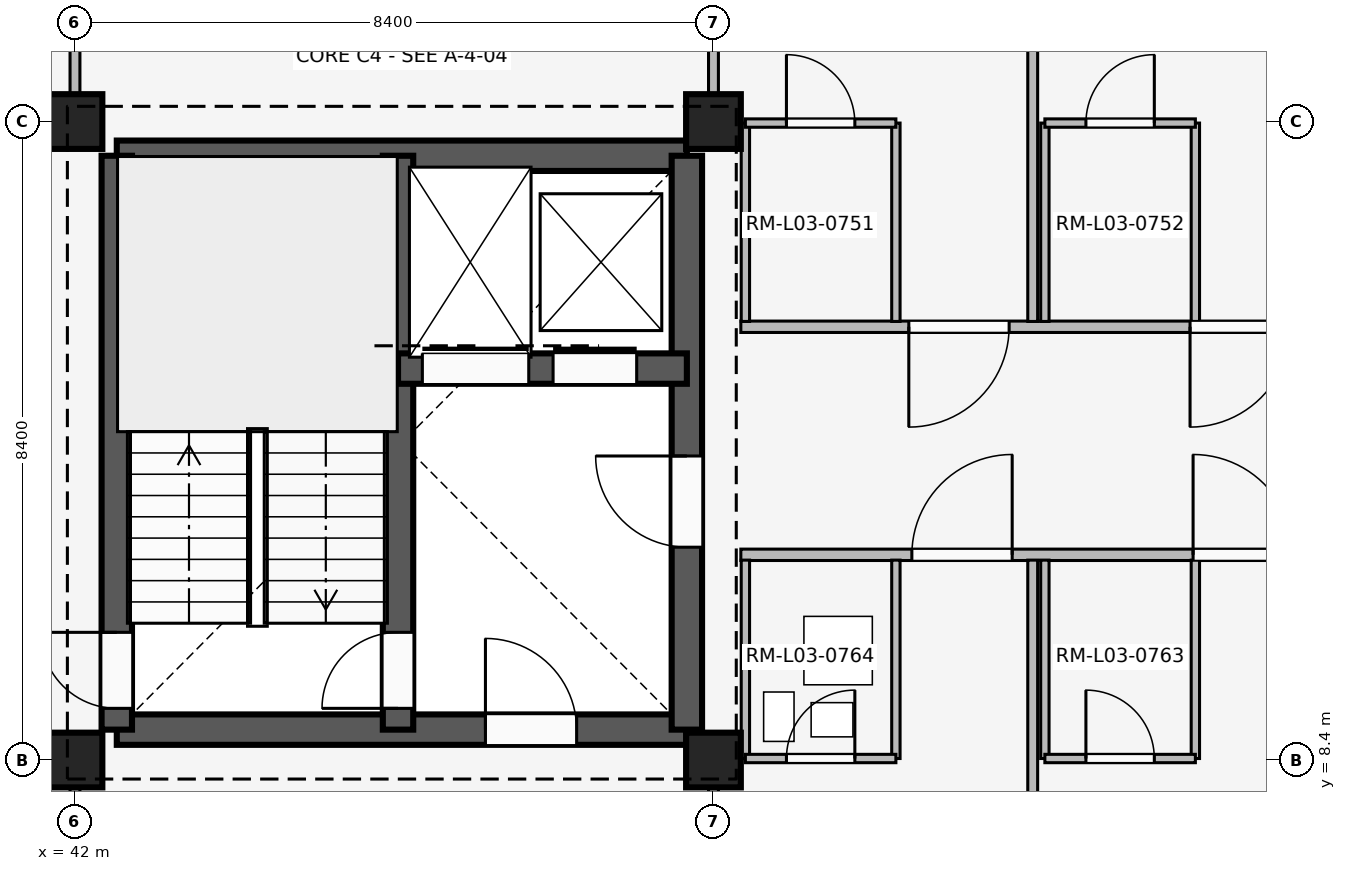
"""IFC4 building model, lengths in metres.
Left out: names, types, materials, properties, quantities, classifications, styles, units other than length and angle.
Written with IfcOpenShell. Run it as: python <this file> out.ifc"""

import sys

from ifc_helpers import new_model, si_unit, direction, frame, frame_2d, origin, origin_2d, place, context, subcontext, project, spatial, rectangle, extrude, element, fill, save


model = new_model("IFC4")
c1 = context("Model", 3, precision=1e-05, world=origin(), true_north=direction((0.0, 1.0)))
c2 = subcontext(c1, "Body", "Model", "MODEL_VIEW")
j1 = project(units=[si_unit("LENGTHUNIT", "METRE"), si_unit("PLANEANGLEUNIT", "RADIAN")], contexts=[c1])
p1 = place(None, origin())
s1 = spatial("IfcSite", under=j1, at=p1, CompositionType="ELEMENT")
p2 = place(p1, origin())
s2 = spatial("IfcBuilding", under=s1, at=p2, CompositionType="ELEMENT")
p3 = place(p2, frame((0.0, 0.0, 12.9)))
s3 = spatial("IfcBuildingStorey", under=s2, at=p3, CompositionType="ELEMENT", Elevation=12.9)
for number, where, z_axis, x_axis in (
    (1, (42.0, 8.4, 0.0), (0.0, 0.0, 1.0), (1.0, 0.0, 0.0)),
    (2, (42.0, 16.8, 0.0), (0.0, 0.0, 1.0), (1.0, 0.0, 0.0)),
    (3, (50.4, 8.4, 0.0), (0.0, 0.0, 1.0), (1.0, 0.0, 0.0)),
    (4, (50.4, 16.8, 0.0), (0.0, 0.0, 1.0), (1.0, 0.0, 0.0)),
):
    element("IfcColumn", number, at=place(p3, frame(where, z_axis=z_axis, x_axis=x_axis)), inside=s3, PredefinedType="COLUMN", context=c2, shape_type="SweptSolid", body=[
        extrude(rectangle(XDim=0.72, YDim=0.72, at=origin_2d()), origin(), (0.0, 0.0, 1.0), 3.3),
    ])
p4 = place(p3, frame((42.55, 8.8, 0.0), z_axis=(0.0, 0.0, 1.0), x_axis=(1.0, 0.0, 0.0)))
e5 = element("IfcWall", 5, at=p4, inside=s3, PredefinedType="SHEAR", context=c2, shape_type="SweptSolid", body=[
    extrude(rectangle(XDim=7.5, YDim=0.4, at=frame_2d((3.75, 0.0))), origin(), (0.0, 0.0, 1.0), 3.02),
])
p5 = place(p4, frame((4.85, 0.0, 0.0)))
e6 = element("IfcOpeningElement", 6, at=p5, cuts=e5, PredefinedType="OPENING", context=c2, shape_type="SweptSolid", body=[
    extrude(rectangle(XDim=1.2, YDim=2.2, at=frame_2d((0.6, 1.1))), frame((0.0, 0.21, 0.0), z_axis=(0.0, -1.0, 0.0), x_axis=(1.0, 0.0, 0.0)), (0.0, 0.0, 1.0), 0.42),
])
p6 = place(p3, frame((42.55, 16.35, 0.0), z_axis=(0.0, 0.0, 1.0), x_axis=(1.0, 0.0, 0.0)))
e7 = element("IfcWall", 7, at=p6, inside=s3, PredefinedType="SHEAR", context=c2, shape_type="SweptSolid", body=[
    extrude(rectangle(XDim=7.5, YDim=0.4, at=frame_2d((3.75, 0.0))), origin(), (0.0, 0.0, 1.0), 3.02),
])
p7 = place(p3, frame((42.55, 8.8, 0.0), z_axis=(0.0, 0.0, 1.0), x_axis=(0.0, 1.0, 0.0)))
e8 = element("IfcWall", 8, at=p7, inside=s3, PredefinedType="SHEAR", context=c2, shape_type="SweptSolid", body=[
    extrude(rectangle(XDim=7.55, YDim=0.4, at=frame_2d((3.775, 0.0))), origin(), (0.0, 0.0, 1.0), 3.02),
])
p8 = place(p7, frame((0.28, 0.0, 0.0)))
e9 = element("IfcOpeningElement", 9, at=p8, cuts=e8, PredefinedType="OPENING", context=c2, shape_type="SweptSolid", body=[
    extrude(rectangle(XDim=1.0, YDim=2.15, at=frame_2d((0.5, 1.075))), frame((0.0, 0.21, 0.0), z_axis=(0.0, -1.0, 0.0), x_axis=(1.0, 0.0, 0.0)), (0.0, 0.0, 1.0), 0.42),
])
p9 = place(p3, frame((50.05, 8.8, 0.0), z_axis=(0.0, 0.0, 1.0), x_axis=(0.0, 1.0, 0.0)))
e10 = element("IfcWall", 10, at=p9, inside=s3, PredefinedType="SHEAR", context=c2, shape_type="SweptSolid", body=[
    extrude(rectangle(XDim=7.55, YDim=0.4, at=frame_2d((3.775, 0.0))), origin(), (0.0, 0.0, 1.0), 3.02),
])
p10 = place(p9, frame((2.4, 0.0, 0.0)))
e11 = element("IfcOpeningElement", 11, at=p10, cuts=e10, PredefinedType="OPENING", context=c2, shape_type="SweptSolid", body=[
    extrude(rectangle(XDim=1.2, YDim=2.2, at=frame_2d((0.6, 1.1))), frame((0.0, 0.21, 0.0), z_axis=(0.0, -1.0, 0.0), x_axis=(1.0, 0.0, 0.0)), (0.0, 0.0, 1.0), 0.42),
])
p11 = place(p3, frame((46.25, 8.8, 0.0), z_axis=(0.0, 0.0, 1.0), x_axis=(0.0, 1.0, 0.0)))
e12 = element("IfcWall", 12, at=p11, inside=s3, PredefinedType="SHEAR", context=c2, shape_type="SweptSolid", body=[
    extrude(rectangle(XDim=7.55, YDim=0.4, at=frame_2d((3.775, 0.0))), origin(), (0.0, 0.0, 1.0), 3.02),
])
p12 = place(p11, frame((0.28, 0.0, 0.0)))
e13 = element("IfcOpeningElement", 13, at=p12, cuts=e12, PredefinedType="OPENING", context=c2, shape_type="SweptSolid", body=[
    extrude(rectangle(XDim=1.0, YDim=2.15, at=frame_2d((0.5, 1.075))), frame((0.0, 0.21, 0.0), z_axis=(0.0, -1.0, 0.0), x_axis=(1.0, 0.0, 0.0)), (0.0, 0.0, 1.0), 0.42),
])
p13 = place(p3, frame((46.25, 13.55, 0.0), z_axis=(0.0, 0.0, 1.0), x_axis=(1.0, 0.0, 0.0)))
e14 = element("IfcWall", 14, at=p13, inside=s3, PredefinedType="SHEAR", context=c2, shape_type="SweptSolid", body=[
    extrude(rectangle(XDim=3.8, YDim=0.4, at=frame_2d((1.9, 0.0))), origin(), (0.0, 0.0, 1.0), 3.02),
])
p14 = place(p13, frame((0.32, 0.0, 0.0)))
e15 = element("IfcOpeningElement", 15, at=p14, cuts=e14, PredefinedType="OPENING", context=c2, shape_type="SweptSolid", body=[
    extrude(rectangle(XDim=1.4, YDim=2.25, at=frame_2d((0.7, 1.125))), frame((0.0, 0.21, 0.0), z_axis=(0.0, -1.0, 0.0), x_axis=(1.0, 0.0, 0.0)), (0.0, 0.0, 1.0), 0.42),
])
p15 = place(p13, frame((2.04, 0.0, 0.0)))
e16 = element("IfcOpeningElement", 16, at=p15, cuts=e14, PredefinedType="OPENING", context=c2, shape_type="SweptSolid", body=[
    extrude(rectangle(XDim=1.1, YDim=2.15, at=frame_2d((0.55, 1.075))), frame((0.0, 0.21, 0.0), z_axis=(0.0, -1.0, 0.0), x_axis=(1.0, 0.0, 0.0)), (0.0, 0.0, 1.0), 0.42),
])
p16 = place(p3, frame((42.0, 0.14, 0.0), z_axis=(0.0, 0.0, 1.0), x_axis=(0.0, 1.0, 0.0)))
e17 = element("IfcWall", 17, at=p16, inside=s3, PredefinedType="PARTITIONING", context=c2, shape_type="SweptSolid", body=[
    extrude(rectangle(XDim=8.21, YDim=0.13, at=frame_2d((4.105, 0.0))), origin(), (0.0, 0.0, 1.0), 2.42),
])
p17 = place(p16, frame((3.64, 0.0, 0.0)))
e18 = element("IfcOpeningElement", 18, at=p17, cuts=e17, PredefinedType="OPENING", context=c2, shape_type="SweptSolid", body=[
    extrude(rectangle(XDim=1.08, YDim=2.15, at=frame_2d((0.54, 1.075))), frame((0.0, 0.075, 0.0), z_axis=(0.0, -1.0, 0.0), x_axis=(1.0, 0.0, 0.0)), (0.0, 0.0, 1.0), 0.15),
])
p18 = place(p3, frame((42.0, 17.15, 0.0), z_axis=(0.0, 0.0, 1.0), x_axis=(0.0, 1.0, 0.0)))
e19 = element("IfcWall", 19, at=p18, inside=s3, PredefinedType="PARTITIONING", context=c2, shape_type="SweptSolid", body=[
    extrude(rectangle(XDim=7.91, YDim=0.13, at=frame_2d((3.955, 0.0))), origin(), (0.0, 0.0, 1.0), 2.42),
])
p19 = place(p18, frame((3.4, 0.0, 0.0)))
e20 = element("IfcOpeningElement", 20, at=p19, cuts=e19, PredefinedType="OPENING", context=c2, shape_type="SweptSolid", body=[
    extrude(rectangle(XDim=1.05, YDim=2.2, at=frame_2d((0.525, 1.1))), frame((0.0, 0.075, 0.0), z_axis=(0.0, -1.0, 0.0), x_axis=(1.0, 0.0, 0.0)), (0.0, 0.0, 1.0), 0.15),
])
p20 = place(p3, frame((50.4, 0.14, 0.0), z_axis=(0.0, 0.0, 1.0), x_axis=(0.0, 1.0, 0.0)))
e21 = element("IfcWall", 21, at=p20, inside=s3, PredefinedType="PARTITIONING", context=c2, shape_type="SweptSolid", body=[
    extrude(rectangle(XDim=8.21, YDim=0.13, at=frame_2d((4.105, 0.0))), origin(), (0.0, 0.0, 1.0), 2.42),
])
p21 = place(p20, frame((3.64, 0.0, 0.0)))
e22 = element("IfcOpeningElement", 22, at=p21, cuts=e21, PredefinedType="OPENING", context=c2, shape_type="SweptSolid", body=[
    extrude(rectangle(XDim=1.08, YDim=2.15, at=frame_2d((0.54, 1.075))), frame((0.0, 0.075, 0.0), z_axis=(0.0, -1.0, 0.0), x_axis=(1.0, 0.0, 0.0)), (0.0, 0.0, 1.0), 0.15),
])
p22 = place(p3, frame((50.4, 17.15, 0.0), z_axis=(0.0, 0.0, 1.0), x_axis=(0.0, 1.0, 0.0)))
e23 = element("IfcWall", 23, at=p22, inside=s3, PredefinedType="PARTITIONING", context=c2, shape_type="SweptSolid", body=[
    extrude(rectangle(XDim=7.91, YDim=0.13, at=frame_2d((3.955, 0.0))), origin(), (0.0, 0.0, 1.0), 2.42),
])
p23 = place(p22, frame((3.4, 0.0, 0.0)))
e24 = element("IfcOpeningElement", 24, at=p23, cuts=e23, PredefinedType="OPENING", context=c2, shape_type="SweptSolid", body=[
    extrude(rectangle(XDim=1.05, YDim=2.2, at=frame_2d((0.525, 1.1))), frame((0.0, 0.075, 0.0), z_axis=(0.0, -1.0, 0.0), x_axis=(1.0, 0.0, 0.0)), (0.0, 0.0, 1.0), 0.15),
])
p24 = place(p3, frame((50.76, 11.1, 0.0), z_axis=(0.0, 0.0, 1.0), x_axis=(1.0, 0.0, 0.0)))
e25 = element("IfcWall", 25, at=p24, inside=s3, PredefinedType="PARTITIONING", context=c2, shape_type="SweptSolid", body=[
    extrude(rectangle(XDim=7.96, YDim=0.15, at=frame_2d((3.98, 0.0))), origin(), (0.0, 0.0, 1.0), 2.42),
])
p25 = place(p24, frame((2.25, 0.0, 0.0)))
e26 = element("IfcOpeningElement", 26, at=p25, cuts=e25, PredefinedType="OPENING", context=c2, shape_type="SweptSolid", body=[
    extrude(rectangle(XDim=1.32, YDim=2.25, at=frame_2d((0.66, 1.125))), frame((0.0, 0.085, 0.0), z_axis=(0.0, -1.0, 0.0), x_axis=(1.0, 0.0, 0.0)), (0.0, 0.0, 1.0), 0.17),
])
p26 = place(p24, frame((5.95, 0.0, 0.0)))
e27 = element("IfcOpeningElement", 27, at=p26, cuts=e25, PredefinedType="OPENING", context=c2, shape_type="SweptSolid", body=[
    extrude(rectangle(XDim=1.32, YDim=2.25, at=frame_2d((0.66, 1.125))), frame((0.0, 0.085, 0.0), z_axis=(0.0, -1.0, 0.0), x_axis=(1.0, 0.0, 0.0)), (0.0, 0.0, 1.0), 0.17),
])
p27 = place(p3, frame((54.6, 0.1, 0.0), z_axis=(0.0, 0.0, 1.0), x_axis=(0.0, 1.0, 0.0)))
e28 = element("IfcWall", 28, at=p27, inside=s3, PredefinedType="PARTITIONING", context=c2, shape_type="SweptSolid", body=[
    extrude(rectangle(XDim=10.93, YDim=0.13, at=frame_2d((5.465, 0.0))), origin(), (0.0, 0.0, 1.0), 2.42),
])
for number, where, z_axis, x_axis in (
    (29, (50.82, 8.42, 0.0), (0.0, 0.0, 1.0), (0.0, 1.0, 0.0)),
    (30, (52.8, 8.42, 0.0), (0.0, 0.0, 1.0), (0.0, 1.0, 0.0)),
):
    element("IfcWall", number, at=place(p3, frame(where, z_axis=z_axis, x_axis=x_axis)), inside=s3, PredefinedType="PARTITIONING", context=c2, shape_type="SweptSolid", body=[
        extrude(rectangle(XDim=2.61, YDim=0.11, at=frame_2d((1.305, 0.0))), origin(), (0.0, 0.0, 1.0), 2.42),
    ])
p28 = place(p3, frame((50.82, 8.42, 0.0), z_axis=(0.0, 0.0, 1.0), x_axis=(1.0, 0.0, 0.0)))
e31 = element("IfcWall", 31, at=p28, inside=s3, PredefinedType="PARTITIONING", context=c2, shape_type="SweptSolid", body=[
    extrude(rectangle(XDim=1.98, YDim=0.11, at=frame_2d((0.99, 0.0))), origin(), (0.0, 0.0, 1.0), 2.42),
])
p29 = place(p28, frame((0.54, 0.0, 0.0)))
e32 = element("IfcOpeningElement", 32, at=p29, cuts=e31, PredefinedType="OPENING", context=c2, shape_type="SweptSolid", body=[
    extrude(rectangle(XDim=0.9, YDim=2.1, at=frame_2d((0.45, 1.05))), frame((0.0, 0.065, 0.0), z_axis=(0.0, -1.0, 0.0), x_axis=(1.0, 0.0, 0.0)), (0.0, 0.0, 1.0), 0.13),
])
for number, where, z_axis, x_axis in (
    (33, (54.76, 8.42, 0.0), (0.0, 0.0, 1.0), (0.0, 1.0, 0.0)),
    (34, (56.74, 8.42, 0.0), (0.0, 0.0, 1.0), (0.0, 1.0, 0.0)),
):
    element("IfcWall", number, at=place(p3, frame(where, z_axis=z_axis, x_axis=x_axis)), inside=s3, PredefinedType="PARTITIONING", context=c2, shape_type="SweptSolid", body=[
        extrude(rectangle(XDim=2.61, YDim=0.11, at=frame_2d((1.305, 0.0))), origin(), (0.0, 0.0, 1.0), 2.42),
    ])
p30 = place(p3, frame((54.76, 8.42, 0.0), z_axis=(0.0, 0.0, 1.0), x_axis=(1.0, 0.0, 0.0)))
e35 = element("IfcWall", 35, at=p30, inside=s3, PredefinedType="PARTITIONING", context=c2, shape_type="SweptSolid", body=[
    extrude(rectangle(XDim=1.98, YDim=0.11, at=frame_2d((0.99, 0.0))), origin(), (0.0, 0.0, 1.0), 2.42),
])
p31 = place(p30, frame((0.54, 0.0, 0.0)))
e36 = element("IfcOpeningElement", 36, at=p31, cuts=e35, PredefinedType="OPENING", context=c2, shape_type="SweptSolid", body=[
    extrude(rectangle(XDim=0.9, YDim=2.1, at=frame_2d((0.45, 1.05))), frame((0.0, 0.065, 0.0), z_axis=(0.0, -1.0, 0.0), x_axis=(1.0, 0.0, 0.0)), (0.0, 0.0, 1.0), 0.13),
])
p32 = place(p3, frame((58.72, 14.1, 0.0), z_axis=(0.0, 0.0, 1.0), x_axis=(-1.0, 0.0, 0.0)))
e37 = element("IfcWall", 37, at=p32, inside=s3, PredefinedType="PARTITIONING", context=c2, shape_type="SweptSolid", body=[
    extrude(rectangle(XDim=7.96, YDim=0.15, at=frame_2d((3.98, 0.0))), origin(), (0.0, 0.0, 1.0), 2.42),
])
p33 = place(p32, frame((0.73, 0.0, 0.0)))
e38 = element("IfcOpeningElement", 38, at=p33, cuts=e37, PredefinedType="OPENING", context=c2, shape_type="SweptSolid", body=[
    extrude(rectangle(XDim=1.32, YDim=2.25, at=frame_2d((0.66, 1.125))), frame((0.0, 0.085, 0.0), z_axis=(0.0, -1.0, 0.0), x_axis=(1.0, 0.0, 0.0)), (0.0, 0.0, 1.0), 0.17),
])
p34 = place(p32, frame((4.43, 0.0, 0.0)))
e39 = element("IfcOpeningElement", 39, at=p34, cuts=e37, PredefinedType="OPENING", context=c2, shape_type="SweptSolid", body=[
    extrude(rectangle(XDim=1.32, YDim=2.25, at=frame_2d((0.66, 1.125))), frame((0.0, 0.085, 0.0), z_axis=(0.0, -1.0, 0.0), x_axis=(1.0, 0.0, 0.0)), (0.0, 0.0, 1.0), 0.17),
])
p35 = place(p3, frame((54.6, 14.17, 0.0), z_axis=(0.0, 0.0, 1.0), x_axis=(0.0, 1.0, 0.0)))
e40 = element("IfcWall", 40, at=p35, inside=s3, PredefinedType="PARTITIONING", context=c2, shape_type="SweptSolid", body=[
    extrude(rectangle(XDim=10.93, YDim=0.13, at=frame_2d((5.465, 0.0))), origin(), (0.0, 0.0, 1.0), 2.42),
])
for number, where, z_axis, x_axis in (
    (41, (50.82, 14.17, 0.0), (0.0, 0.0, 1.0), (0.0, 1.0, 0.0)),
    (42, (52.8, 14.17, 0.0), (0.0, 0.0, 1.0), (0.0, 1.0, 0.0)),
):
    element("IfcWall", number, at=place(p3, frame(where, z_axis=z_axis, x_axis=x_axis)), inside=s3, PredefinedType="PARTITIONING", context=c2, shape_type="SweptSolid", body=[
        extrude(rectangle(XDim=2.61, YDim=0.11, at=frame_2d((1.305, 0.0))), origin(), (0.0, 0.0, 1.0), 2.42),
    ])
p36 = place(p3, frame((50.82, 16.78, 0.0), z_axis=(0.0, 0.0, 1.0), x_axis=(1.0, 0.0, 0.0)))
e43 = element("IfcWall", 43, at=p36, inside=s3, PredefinedType="PARTITIONING", context=c2, shape_type="SweptSolid", body=[
    extrude(rectangle(XDim=1.98, YDim=0.11, at=frame_2d((0.99, 0.0))), origin(), (0.0, 0.0, 1.0), 2.42),
])
p37 = place(p36, frame((0.54, 0.0, 0.0)))
e44 = element("IfcOpeningElement", 44, at=p37, cuts=e43, PredefinedType="OPENING", context=c2, shape_type="SweptSolid", body=[
    extrude(rectangle(XDim=0.9, YDim=2.1, at=frame_2d((0.45, 1.05))), frame((0.0, 0.065, 0.0), z_axis=(0.0, -1.0, 0.0), x_axis=(1.0, 0.0, 0.0)), (0.0, 0.0, 1.0), 0.13),
])
for number, where, z_axis, x_axis in (
    (45, (54.76, 14.17, 0.0), (0.0, 0.0, 1.0), (0.0, 1.0, 0.0)),
    (46, (56.74, 14.17, 0.0), (0.0, 0.0, 1.0), (0.0, 1.0, 0.0)),
):
    element("IfcWall", number, at=place(p3, frame(where, z_axis=z_axis, x_axis=x_axis)), inside=s3, PredefinedType="PARTITIONING", context=c2, shape_type="SweptSolid", body=[
        extrude(rectangle(XDim=2.61, YDim=0.11, at=frame_2d((1.305, 0.0))), origin(), (0.0, 0.0, 1.0), 2.42),
    ])
p38 = place(p3, frame((54.76, 16.78, 0.0), z_axis=(0.0, 0.0, 1.0), x_axis=(1.0, 0.0, 0.0)))
e47 = element("IfcWall", 47, at=p38, inside=s3, PredefinedType="PARTITIONING", context=c2, shape_type="SweptSolid", body=[
    extrude(rectangle(XDim=1.98, YDim=0.11, at=frame_2d((0.99, 0.0))), origin(), (0.0, 0.0, 1.0), 2.42),
])
p39 = place(p38, frame((0.54, 0.0, 0.0)))
e48 = element("IfcOpeningElement", 48, at=p39, cuts=e47, PredefinedType="OPENING", context=c2, shape_type="SweptSolid", body=[
    extrude(rectangle(XDim=0.9, YDim=2.1, at=frame_2d((0.45, 1.05))), frame((0.0, 0.065, 0.0), z_axis=(0.0, -1.0, 0.0), x_axis=(1.0, 0.0, 0.0)), (0.0, 0.0, 1.0), 0.13),
])
p40 = place(p10, origin())
e49 = element("IfcDoor", 49, at=p40, inside=s3, OperationType="SINGLE_SWING_RIGHT", PredefinedType="DOOR", context=c2, shape_type="SweptSolid", body=[
    extrude(rectangle(XDim=1.2, YDim=2.2, at=frame_2d((0.6, 1.1))), frame((0.0, 0.025, 0.0), z_axis=(0.0, -1.0, 0.0), x_axis=(1.0, 0.0, 0.0)), (0.0, 0.0, 1.0), 0.05),
])
fill(e11, e49)
p41 = place(p5, origin())
e50 = element("IfcDoor", 50, at=p41, inside=s3, OperationType="SINGLE_SWING_LEFT", PredefinedType="DOOR", context=c2, shape_type="SweptSolid", body=[
    extrude(rectangle(XDim=1.2, YDim=2.2, at=frame_2d((0.6, 1.1))), frame((0.0, 0.025, 0.0), z_axis=(0.0, -1.0, 0.0), x_axis=(1.0, 0.0, 0.0)), (0.0, 0.0, 1.0), 0.05),
])
fill(e6, e50)
p42 = place(p8, origin())
e51 = element("IfcDoor", 51, at=p42, inside=s3, OperationType="SINGLE_SWING_RIGHT", PredefinedType="DOOR", context=c2, shape_type="SweptSolid", body=[
    extrude(rectangle(XDim=1.0, YDim=2.15, at=frame_2d((0.5, 1.075))), frame((0.0, 0.025, 0.0), z_axis=(0.0, -1.0, 0.0), x_axis=(1.0, 0.0, 0.0)), (0.0, 0.0, 1.0), 0.05),
])
fill(e9, e51)
p43 = place(p12, origin())
e52 = element("IfcDoor", 52, at=p43, inside=s3, OperationType="SINGLE_SWING_LEFT", PredefinedType="DOOR", context=c2, shape_type="SweptSolid", body=[
    extrude(rectangle(XDim=1.0, YDim=2.15, at=frame_2d((0.5, 1.075))), frame((0.0, 0.025, 0.0), z_axis=(0.0, -1.0, 0.0), x_axis=(1.0, 0.0, 0.0)), (0.0, 0.0, 1.0), 0.05),
])
fill(e13, e52)
p44 = place(p14, origin())
e53 = element("IfcDoor", 53, at=p44, inside=s3, OperationType="SLIDING_TO_LEFT", PredefinedType="DOOR", context=c2, shape_type="SweptSolid", body=[
    extrude(rectangle(XDim=1.4, YDim=2.25, at=frame_2d((0.7, 1.125))), frame((0.0, 0.025, 0.0), z_axis=(0.0, -1.0, 0.0), x_axis=(1.0, 0.0, 0.0)), (0.0, 0.0, 1.0), 0.05),
])
fill(e15, e53)
p45 = place(p15, origin())
e54 = element("IfcDoor", 54, at=p45, inside=s3, OperationType="SLIDING_TO_LEFT", PredefinedType="DOOR", context=c2, shape_type="SweptSolid", body=[
    extrude(rectangle(XDim=1.1, YDim=2.15, at=frame_2d((0.55, 1.075))), frame((0.0, 0.025, 0.0), z_axis=(0.0, -1.0, 0.0), x_axis=(1.0, 0.0, 0.0)), (0.0, 0.0, 1.0), 0.05),
])
fill(e16, e54)
p46 = place(p25, origin())
e55 = element("IfcDoor", 55, at=p46, inside=s3, OperationType="SINGLE_SWING_RIGHT", PredefinedType="DOOR", context=c2, shape_type="SweptSolid", body=[
    extrude(rectangle(XDim=1.32, YDim=2.25, at=frame_2d((0.66, 1.125))), frame((0.0, 0.025, 0.0), z_axis=(0.0, -1.0, 0.0), x_axis=(1.0, 0.0, 0.0)), (0.0, 0.0, 1.0), 0.05),
])
fill(e26, e55)
p47 = place(p26, origin())
e56 = element("IfcDoor", 56, at=p47, inside=s3, OperationType="SINGLE_SWING_LEFT", PredefinedType="DOOR", context=c2, shape_type="SweptSolid", body=[
    extrude(rectangle(XDim=1.32, YDim=2.25, at=frame_2d((0.66, 1.125))), frame((0.0, 0.025, 0.0), z_axis=(0.0, -1.0, 0.0), x_axis=(1.0, 0.0, 0.0)), (0.0, 0.0, 1.0), 0.05),
])
fill(e27, e56)
p48 = place(p29, origin())
e57 = element("IfcDoor", 57, at=p48, inside=s3, OperationType="SINGLE_SWING_RIGHT", PredefinedType="DOOR", context=c2, shape_type="SweptSolid", body=[
    extrude(rectangle(XDim=0.9, YDim=2.1, at=frame_2d((0.45, 1.05))), frame((0.0, 0.025, 0.0), z_axis=(0.0, -1.0, 0.0), x_axis=(1.0, 0.0, 0.0)), (0.0, 0.0, 1.0), 0.05),
])
fill(e32, e57)
p49 = place(p31, origin())
e58 = element("IfcDoor", 58, at=p49, inside=s3, OperationType="SINGLE_SWING_LEFT", PredefinedType="DOOR", context=c2, shape_type="SweptSolid", body=[
    extrude(rectangle(XDim=0.9, YDim=2.1, at=frame_2d((0.45, 1.05))), frame((0.0, 0.025, 0.0), z_axis=(0.0, -1.0, 0.0), x_axis=(1.0, 0.0, 0.0)), (0.0, 0.0, 1.0), 0.05),
])
fill(e36, e58)
p50 = place(p33, origin())
e59 = element("IfcDoor", 59, at=p50, inside=s3, OperationType="SINGLE_SWING_RIGHT", PredefinedType="DOOR", context=c2, shape_type="SweptSolid", body=[
    extrude(rectangle(XDim=1.32, YDim=2.25, at=frame_2d((0.66, 1.125))), frame((0.0, 0.025, 0.0), z_axis=(0.0, -1.0, 0.0), x_axis=(1.0, 0.0, 0.0)), (0.0, 0.0, 1.0), 0.05),
])
fill(e38, e59)
p51 = place(p34, origin())
e60 = element("IfcDoor", 60, at=p51, inside=s3, OperationType="SINGLE_SWING_RIGHT", PredefinedType="DOOR", context=c2, shape_type="SweptSolid", body=[
    extrude(rectangle(XDim=1.32, YDim=2.25, at=frame_2d((0.66, 1.125))), frame((0.0, 0.025, 0.0), z_axis=(0.0, -1.0, 0.0), x_axis=(1.0, 0.0, 0.0)), (0.0, 0.0, 1.0), 0.05),
])
fill(e39, e60)
p52 = place(p37, origin())
e61 = element("IfcDoor", 61, at=p52, inside=s3, OperationType="SINGLE_SWING_LEFT", PredefinedType="DOOR", context=c2, shape_type="SweptSolid", body=[
    extrude(rectangle(XDim=0.9, YDim=2.1, at=frame_2d((0.45, 1.05))), frame((0.0, 0.025, 0.0), z_axis=(0.0, -1.0, 0.0), x_axis=(1.0, 0.0, 0.0)), (0.0, 0.0, 1.0), 0.05),
])
fill(e44, e61)
p53 = place(p39, origin())
e62 = element("IfcDoor", 62, at=p53, inside=s3, OperationType="SINGLE_SWING_RIGHT", PredefinedType="DOOR", context=c2, shape_type="SweptSolid", body=[
    extrude(rectangle(XDim=0.9, YDim=2.1, at=frame_2d((0.45, 1.05))), frame((0.0, 0.025, 0.0), z_axis=(0.0, -1.0, 0.0), x_axis=(1.0, 0.0, 0.0)), (0.0, 0.0, 1.0), 0.05),
])
fill(e48, e62)
save(model, sys.argv[1])
